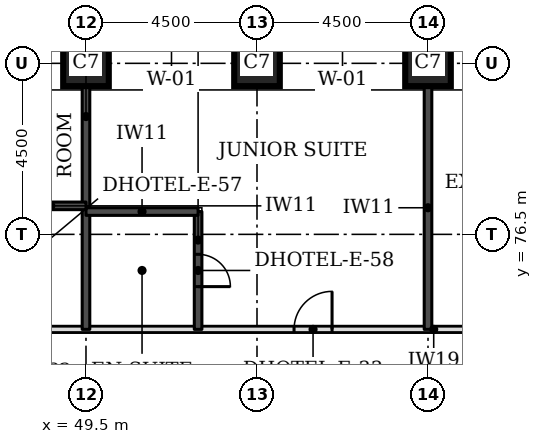
"""IFC4 building model, lengths in metres.
Left out: names, types, materials, properties, quantities, classifications, styles, units other than length and angle.
Written with IfcOpenShell. Run it as: python <this file> out.ifc"""

import sys

from ifc_helpers import new_model, si_unit, direction, frame, frame_2d, origin, origin_2d, place, context, subcontext, project, spatial, rectangle, extrude, element, fill, save


model = new_model("IFC4")
c1 = context("Model", 3, precision=1e-05, world=origin(), true_north=direction((0.0, 1.0)))
c2 = subcontext(c1, "Body", "Model", "MODEL_VIEW")
j1 = project(units=[si_unit("LENGTHUNIT", "METRE"), si_unit("PLANEANGLEUNIT", "RADIAN")], contexts=[c1])
p1 = place(None, origin())
s1 = spatial("IfcSite", under=j1, at=p1, CompositionType="ELEMENT")
p2 = place(p1, origin())
s2 = spatial("IfcBuilding", under=s1, at=p2, CompositionType="ELEMENT")
p3 = place(p2, frame((0.0, 0.0, 39.6)))
s3 = spatial("IfcBuildingStorey", under=s2, at=p3, CompositionType="ELEMENT", Elevation=39.6)
for number, where, z_axis, x_axis in (
    (1, (49.5, 81.0, 0.0), (0.0, 0.0, 1.0), (1.0, 0.0, 0.0)),
    (2, (54.0, 81.0, 0.0), (0.0, 0.0, 1.0), (1.0, 0.0, 0.0)),
    (3, (58.5, 81.0, 0.0), (0.0, 0.0, 1.0), (1.0, 0.0, 0.0)),
):
    element("IfcColumn", number, at=place(p3, frame(where, z_axis=z_axis, x_axis=x_axis)), inside=s3, PredefinedType="COLUMN", context=c2, shape_type="SweptSolid", body=[
        extrude(rectangle(XDim=1.2, YDim=1.2, at=origin_2d()), origin(), (0.0, 0.0, 1.0), 3.3),
    ])
p4 = place(p3, frame((43.0, 74.0, 0.0), z_axis=(0.0, 0.0, 1.0), x_axis=(1.0, 0.0, 0.0)))
e4 = element("IfcWall", 4, at=p4, inside=s3, PredefinedType="PARTITIONING", context=c2, shape_type="SweptSolid", body=[
    extrude(rectangle(XDim=26.5, YDim=0.15, at=frame_2d((13.25, 0.0))), origin(), (0.0, 0.0, 1.0), 3.08),
])
p5 = place(p4, frame((2.825, 0.0, 0.0)))
e5 = element("IfcOpeningElement", 5, at=p5, cuts=e4, PredefinedType="OPENING", context=c2, shape_type="SweptSolid", body=[
    extrude(rectangle(XDim=1.0, YDim=2.1, at=frame_2d((0.5, 1.05))), frame((0.0, 0.085, 0.0), z_axis=(0.0, -1.0, 0.0), x_axis=(1.0, 0.0, 0.0)), (0.0, 0.0, 1.0), 0.17),
])
p6 = place(p4, frame((11.975, 0.0, 0.0)))
e6 = element("IfcOpeningElement", 6, at=p6, cuts=e4, PredefinedType="OPENING", context=c2, shape_type="SweptSolid", body=[
    extrude(rectangle(XDim=1.0, YDim=2.1, at=frame_2d((0.5, 1.05))), frame((0.0, 0.085, 0.0), z_axis=(0.0, -1.0, 0.0), x_axis=(1.0, 0.0, 0.0)), (0.0, 0.0, 1.0), 0.17),
])
p7 = place(p4, frame((18.275, 0.0, 0.0)))
e7 = element("IfcOpeningElement", 7, at=p7, cuts=e4, PredefinedType="OPENING", context=c2, shape_type="SweptSolid", body=[
    extrude(rectangle(XDim=1.0, YDim=2.1, at=frame_2d((0.5, 1.05))), frame((0.0, 0.085, 0.0), z_axis=(0.0, -1.0, 0.0), x_axis=(1.0, 0.0, 0.0)), (0.0, 0.0, 1.0), 0.17),
])
p8 = place(p4, frame((0.5, 0.0, 0.0)))
e8 = element("IfcOpeningElement", 8, at=p8, cuts=e4, PredefinedType="OPENING", context=c2, shape_type="SweptSolid", body=[
    extrude(rectangle(XDim=1.0, YDim=2.1, at=frame_2d((0.5, 1.05))), frame((0.0, 0.085, 0.0), z_axis=(0.0, -1.0, 0.0), x_axis=(1.0, 0.0, 0.0)), (0.0, 0.0, 1.0), 0.17),
])
p9 = place(p4, frame((25.0, 0.0, 0.0)))
e9 = element("IfcOpeningElement", 9, at=p9, cuts=e4, PredefinedType="OPENING", context=c2, shape_type="SweptSolid", body=[
    extrude(rectangle(XDim=1.0, YDim=2.1, at=frame_2d((0.5, 1.05))), frame((0.0, 0.085, 0.0), z_axis=(0.0, -1.0, 0.0), x_axis=(1.0, 0.0, 0.0)), (0.0, 0.0, 1.0), 0.17),
])
p10 = place(p3, frame((49.5, 74.0, 0.0), z_axis=(0.0, 0.0, 1.0), x_axis=(0.0, 1.0, 0.0)))
e10 = element("IfcWall", 10, at=p10, inside=s3, PredefinedType="SOLIDWALL", context=c2, shape_type="SweptSolid", body=[
    extrude(rectangle(XDim=6.4, YDim=0.2, at=frame_2d((3.2, 0.0))), origin(), (0.0, 0.0, 1.0), 3.08),
])
p11 = place(p3, frame((52.45, 74.0, 0.0), z_axis=(0.0, 0.0, 1.0), x_axis=(0.0, 1.0, 0.0)))
e11 = element("IfcWall", 11, at=p11, inside=s3, PredefinedType="SOLIDWALL", context=c2, shape_type="SweptSolid", body=[
    extrude(rectangle(XDim=3.1, YDim=0.2, at=frame_2d((1.55, 0.0))), origin(), (0.0, 0.0, 1.0), 3.08),
])
p12 = place(p11, frame((1.125, 0.0, 0.0)))
e12 = element("IfcOpeningElement", 12, at=p12, cuts=e11, PredefinedType="OPENING", context=c2, shape_type="SweptSolid", body=[
    extrude(rectangle(XDim=0.85, YDim=2.1, at=frame_2d((0.425, 1.05))), frame((0.0, 0.11, 0.0), z_axis=(0.0, -1.0, 0.0), x_axis=(1.0, 0.0, 0.0)), (0.0, 0.0, 1.0), 0.22),
])
p13 = place(p3, frame((58.5, 74.0, 0.0), z_axis=(0.0, 0.0, 1.0), x_axis=(0.0, 1.0, 0.0)))
e13 = element("IfcWall", 13, at=p13, inside=s3, PredefinedType="SOLIDWALL", context=c2, shape_type="SweptSolid", body=[
    extrude(rectangle(XDim=6.4, YDim=0.2, at=frame_2d((3.2, 0.0))), origin(), (0.0, 0.0, 1.0), 3.08),
])
p14 = place(p3, frame((49.5, 77.1, 0.0), z_axis=(0.0, 0.0, 1.0), x_axis=(1.0, 0.0, 0.0)))
e14 = element("IfcWall", 14, at=p14, inside=s3, PredefinedType="SOLIDWALL", context=c2, shape_type="SweptSolid", body=[
    extrude(rectangle(XDim=2.95, YDim=0.2, at=frame_2d((1.475, 0.0))), origin(), (0.0, 0.0, 1.0), 3.08),
])
p15 = place(p3, frame((47.65, 77.25, 0.0), z_axis=(0.0, 0.0, 1.0), x_axis=(1.0, 0.0, 0.0)))
e15 = element("IfcWall", 15, at=p15, inside=s3, PredefinedType="SOLIDWALL", context=c2, shape_type="SweptSolid", body=[
    extrude(rectangle(XDim=1.85, YDim=0.2, at=frame_2d((0.925, 0.0))), origin(), (0.0, 0.0, 1.0), 3.08),
])
p16 = place(p6, origin())
e16 = element("IfcDoor", 16, at=p16, inside=s3, OperationType="SINGLE_SWING_RIGHT", PredefinedType="DOOR", context=c2, shape_type="SweptSolid", body=[
    extrude(rectangle(XDim=1.0, YDim=2.1, at=frame_2d((0.5, 1.05))), frame((0.0, 0.025, 0.0), z_axis=(0.0, -1.0, 0.0), x_axis=(1.0, 0.0, 0.0)), (0.0, 0.0, 1.0), 0.05),
])
fill(e6, e16)
p17 = place(p12, frame((0.85, 0.0, 0.0), z_axis=(0.0, 0.0, 1.0), x_axis=(-1.0, 0.0, 0.0)))
e17 = element("IfcDoor", 17, at=p17, inside=s3, OperationType="SINGLE_SWING_RIGHT", PredefinedType="DOOR", context=c2, shape_type="SweptSolid", body=[
    extrude(rectangle(XDim=0.85, YDim=2.1, at=frame_2d((0.425, 1.05))), frame((0.0, 0.025, 0.0), z_axis=(0.0, -1.0, 0.0), x_axis=(1.0, 0.0, 0.0)), (0.0, 0.0, 1.0), 0.05),
])
fill(e12, e17)
save(model, sys.argv[1])
